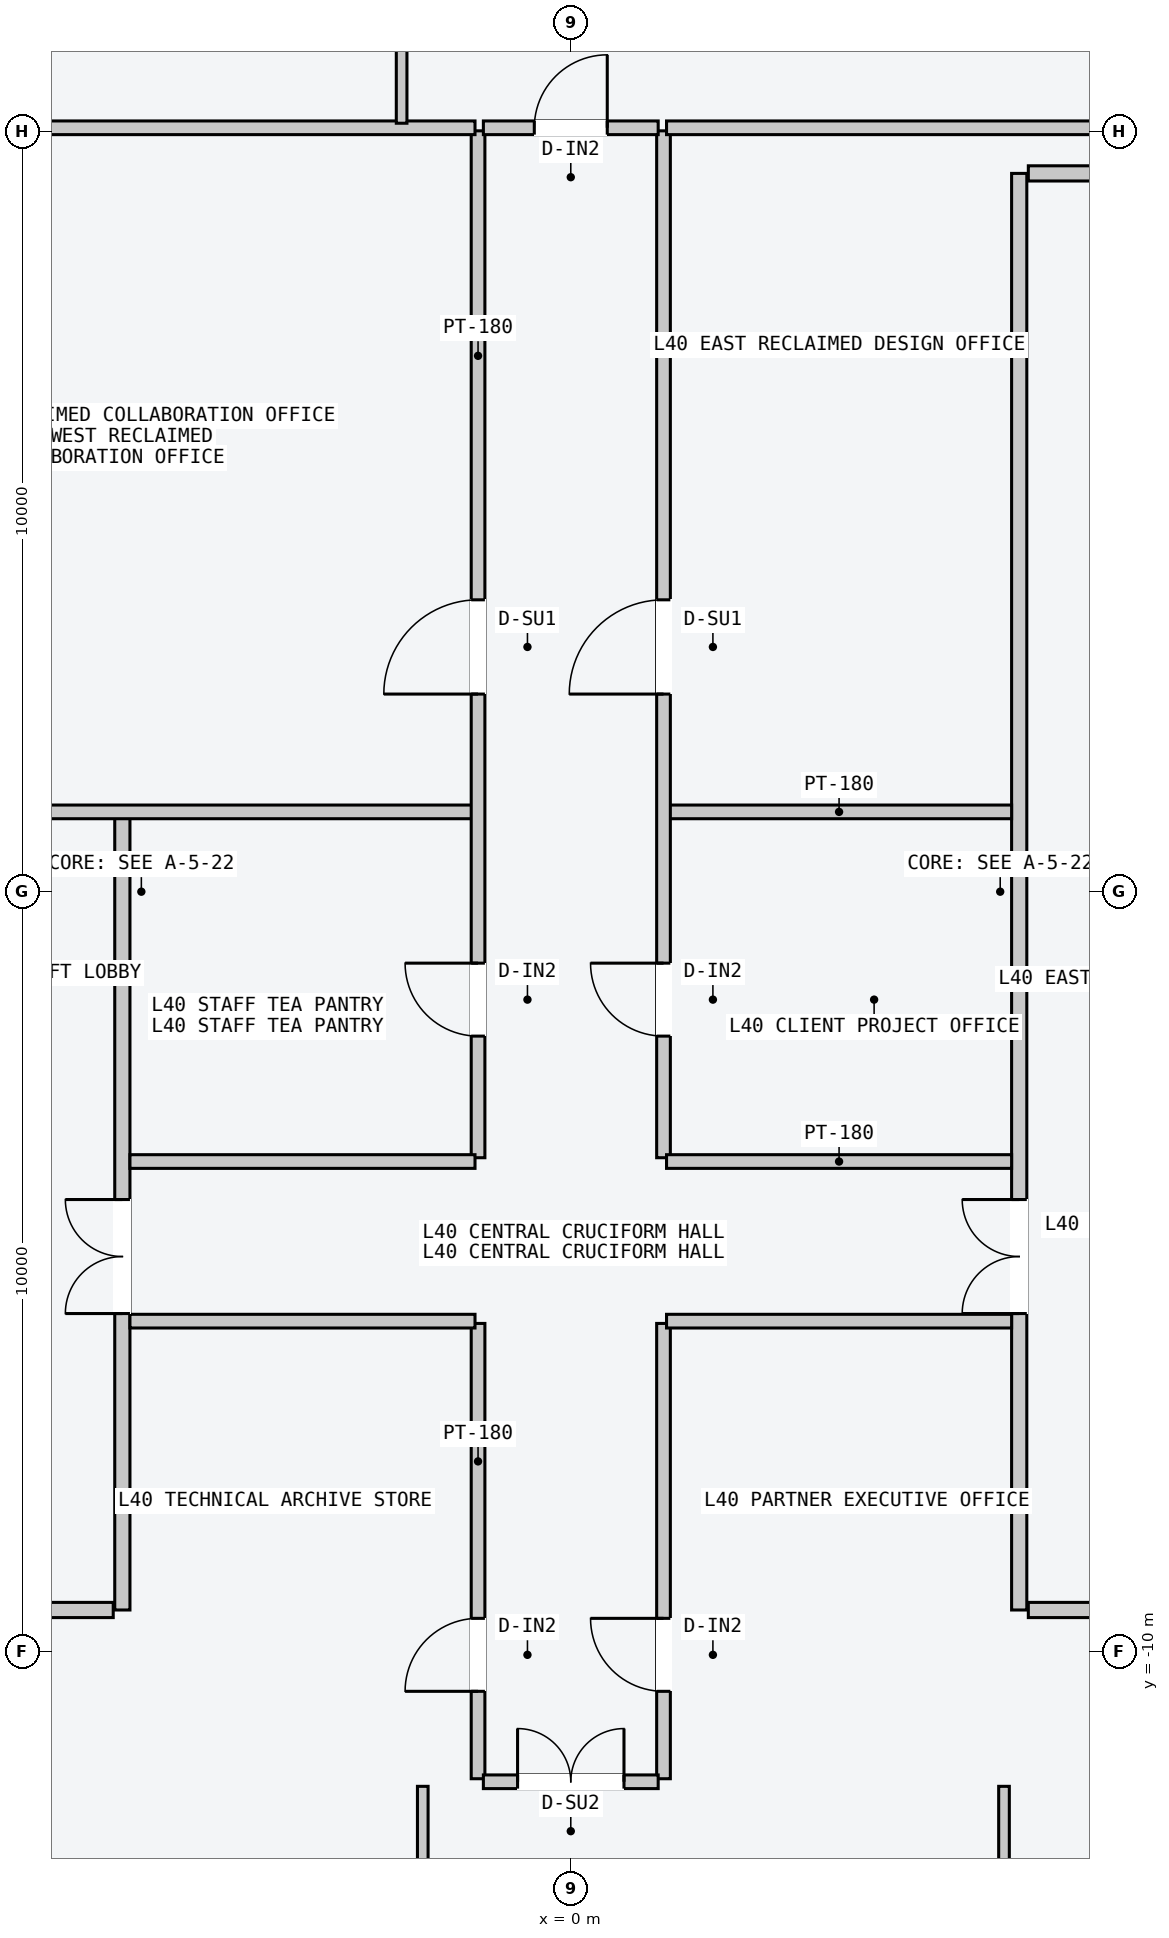
"""IFC4 building model, lengths in metres.
Left out: names, types, materials, properties, quantities, classifications, styles, units other than length and angle.
Written with IfcOpenShell. Run it as: python <this file> out.ifc"""

import sys

from ifc_helpers import new_model, si_unit, direction, frame, frame_2d, origin, place, context, subcontext, project, spatial, rectangle, extrude, element, fill, save


model = new_model("IFC4")
c1 = context("Model", 3, precision=1e-05, world=origin(), true_north=direction((0.0, 1.0)))
c2 = subcontext(c1, "Body", "Model", "MODEL_VIEW")
j1 = project(units=[si_unit("LENGTHUNIT", "METRE"), si_unit("PLANEANGLEUNIT", "RADIAN")], contexts=[c1])
p1 = place(None, origin())
s1 = spatial("IfcSite", under=j1, at=p1, CompositionType="ELEMENT")
p2 = place(p1, origin())
s2 = spatial("IfcBuilding", under=s1, at=p2, CompositionType="ELEMENT")
p3 = place(p2, frame((0.0, 0.0, 155.1)))
s3 = spatial("IfcBuildingStorey", under=s2, at=p3, CompositionType="ELEMENT", Elevation=155.1)
p4 = place(p3, frame((-5.9, -9.45, 0.0), z_axis=(0.0, 0.0, 1.0), x_axis=(0.0, 1.0, 0.0)))
e1 = element("IfcWall", 1, at=p4, inside=s3, PredefinedType="PARTITIONING", context=c2, shape_type="SweptSolid", body=[
    extrude(rectangle(XDim=10.5, YDim=0.2, at=frame_2d((5.25, 0.0))), origin(), (0.0, 0.0, 1.0), 3.4),
])
p5 = place(p4, frame((3.9, 0.0, 0.0)))
e2 = element("IfcOpeningElement", 2, at=p5, cuts=e1, PredefinedType="OPENING", context=c2, shape_type="SweptSolid", body=[
    extrude(rectangle(XDim=1.5, YDim=2.2, at=frame_2d((0.75, 1.1))), frame((0.0, 0.11, 0.0), z_axis=(0.0, -1.0, 0.0), x_axis=(1.0, 0.0, 0.0)), (0.0, 0.0, 1.0), 0.22),
])
p6 = place(p3, frame((-6.02, -9.45, 0.0), z_axis=(0.0, 0.0, 1.0), x_axis=(-1.0, 0.0, 0.0)))
e3 = element("IfcWall", 3, at=p6, inside=s3, PredefinedType="PARTITIONING", context=c2, shape_type="SweptSolid", body=[
    extrude(rectangle(XDim=1.8, YDim=0.2, at=frame_2d((0.9, 0.0))), origin(), (0.0, 0.0, 1.0), 3.4),
])
p7 = place(p3, frame((5.9, -9.45, 0.0), z_axis=(0.0, 0.0, 1.0), x_axis=(0.0, 1.0, 0.0)))
e4 = element("IfcWall", 4, at=p7, inside=s3, PredefinedType="PARTITIONING", context=c2, shape_type="SweptSolid", body=[
    extrude(rectangle(XDim=18.9, YDim=0.2, at=frame_2d((9.45, 0.0))), origin(), (0.0, 0.0, 1.0), 3.4),
])
p8 = place(p7, frame((3.9, 0.0, 0.0)))
e5 = element("IfcOpeningElement", 5, at=p8, cuts=e4, PredefinedType="OPENING", context=c2, shape_type="SweptSolid", body=[
    extrude(rectangle(XDim=1.5, YDim=2.2, at=frame_2d((0.75, 1.1))), frame((0.0, 0.11, 0.0), z_axis=(0.0, -1.0, 0.0), x_axis=(1.0, 0.0, 0.0)), (0.0, 0.0, 1.0), 0.22),
])
for number, where, z_axis, x_axis in (
    (6, (6.02, -9.45, 0.0), (0.0, 0.0, 1.0), (1.0, 0.0, 0.0)),
    (7, (6.02, 9.45, 0.0), (0.0, 0.0, 1.0), (1.0, 0.0, 0.0)),
):
    element("IfcWall", number, at=place(p3, frame(where, z_axis=z_axis, x_axis=x_axis)), inside=s3, PredefinedType="PARTITIONING", context=c2, shape_type="SweptSolid", body=[
        extrude(rectangle(XDim=1.8, YDim=0.2, at=frame_2d((0.9, 0.0))), origin(), (0.0, 0.0, 1.0), 3.4),
    ])
p9 = place(p3, frame((-10.05, 1.05, 0.0), z_axis=(0.0, 0.0, 1.0), x_axis=(1.0, 0.0, 0.0)))
e8 = element("IfcWall", 8, at=p9, inside=s3, PredefinedType="PARTITIONING", context=c2, shape_type="SweptSolid", body=[
    extrude(rectangle(XDim=8.79, YDim=0.18, at=frame_2d((4.395, 0.0))), origin(), (0.0, 0.0, 1.0), 3.4),
])
p10 = place(p3, frame((-1.22, -3.5, 0.0), z_axis=(0.0, 0.0, 1.0), x_axis=(0.0, 1.0, 0.0)))
e9 = element("IfcWall", 9, at=p10, inside=s3, PredefinedType="PARTITIONING", context=c2, shape_type="SweptSolid", body=[
    extrude(rectangle(XDim=13.51, YDim=0.18, at=frame_2d((6.755, 0.0))), origin(), (0.0, 0.0, 1.0), 3.4),
])
p11 = place(p10, frame((6.1, 0.0, 0.0)))
e10 = element("IfcOpeningElement", 10, at=p11, cuts=e9, PredefinedType="OPENING", context=c2, shape_type="SweptSolid", body=[
    extrude(rectangle(XDim=1.24, YDim=2.24, at=frame_2d((0.62, 1.12))), frame((0.0, 0.1, 0.0), z_axis=(0.0, -1.0, 0.0), x_axis=(1.0, 0.0, 0.0)), (0.0, 0.0, 1.0), 0.2),
])
p12 = place(p10, frame((1.6, 0.0, 0.0)))
e11 = element("IfcOpeningElement", 11, at=p12, cuts=e9, PredefinedType="OPENING", context=c2, shape_type="SweptSolid", body=[
    extrude(rectangle(XDim=0.96, YDim=2.18, at=frame_2d((0.48, 1.09))), frame((0.0, 0.1, 0.0), z_axis=(0.0, -1.0, 0.0), x_axis=(1.0, 0.0, 0.0)), (0.0, 0.0, 1.0), 0.2),
])
p13 = place(p3, frame((-7.5, 10.05, 0.0), z_axis=(0.0, 0.0, 1.0), x_axis=(1.0, 0.0, 0.0)))
e12 = element("IfcWall", 12, at=p13, inside=s3, PredefinedType="PARTITIONING", context=c2, shape_type="SweptSolid", body=[
    extrude(rectangle(XDim=6.24, YDim=0.18, at=frame_2d((3.12, 0.0))), origin(), (0.0, 0.0, 1.0), 3.4),
])
for number, where, z_axis, x_axis in (
    (13, (-5.8, -3.55, 0.0), (0.0, 0.0, 1.0), (1.0, 0.0, 0.0)),
    (14, (1.26, 1.05, 0.0), (0.0, 0.0, 1.0), (1.0, 0.0, 0.0)),
):
    element("IfcWall", number, at=place(p3, frame(where, z_axis=z_axis, x_axis=x_axis)), inside=s3, PredefinedType="PARTITIONING", context=c2, shape_type="SweptSolid", body=[
        extrude(rectangle(XDim=4.54, YDim=0.18, at=frame_2d((2.27, 0.0))), origin(), (0.0, 0.0, 1.0), 3.4),
    ])
p14 = place(p3, frame((1.22, -3.5, 0.0), z_axis=(0.0, 0.0, 1.0), x_axis=(0.0, 1.0, 0.0)))
e15 = element("IfcWall", 15, at=p14, inside=s3, PredefinedType="PARTITIONING", context=c2, shape_type="SweptSolid", body=[
    extrude(rectangle(XDim=13.51, YDim=0.18, at=frame_2d((6.755, 0.0))), origin(), (0.0, 0.0, 1.0), 3.4),
])
p15 = place(p14, frame((6.1, 0.0, 0.0)))
e16 = element("IfcOpeningElement", 16, at=p15, cuts=e15, PredefinedType="OPENING", context=c2, shape_type="SweptSolid", body=[
    extrude(rectangle(XDim=1.24, YDim=2.24, at=frame_2d((0.62, 1.12))), frame((0.0, 0.1, 0.0), z_axis=(0.0, -1.0, 0.0), x_axis=(1.0, 0.0, 0.0)), (0.0, 0.0, 1.0), 0.2),
])
p16 = place(p14, frame((1.6, 0.0, 0.0)))
e17 = element("IfcOpeningElement", 17, at=p16, cuts=e15, PredefinedType="OPENING", context=c2, shape_type="SweptSolid", body=[
    extrude(rectangle(XDim=0.96, YDim=2.18, at=frame_2d((0.48, 1.09))), frame((0.0, 0.1, 0.0), z_axis=(0.0, -1.0, 0.0), x_axis=(1.0, 0.0, 0.0)), (0.0, 0.0, 1.0), 0.2),
])
p17 = place(p3, frame((1.26, 10.05, 0.0), z_axis=(0.0, 0.0, 1.0), x_axis=(1.0, 0.0, 0.0)))
e18 = element("IfcWall", 18, at=p17, inside=s3, PredefinedType="PARTITIONING", context=c2, shape_type="SweptSolid", body=[
    extrude(rectangle(XDim=6.24, YDim=0.18, at=frame_2d((3.12, 0.0))), origin(), (0.0, 0.0, 1.0), 3.4),
])
p18 = place(p3, frame((1.26, -3.55, 0.0), z_axis=(0.0, 0.0, 1.0), x_axis=(1.0, 0.0, 0.0)))
e19 = element("IfcWall", 19, at=p18, inside=s3, PredefinedType="PARTITIONING", context=c2, shape_type="SweptSolid", body=[
    extrude(rectangle(XDim=4.54, YDim=0.18, at=frame_2d((2.27, 0.0))), origin(), (0.0, 0.0, 1.0), 3.4),
])
p19 = place(p3, frame((-1.22, -11.67, 0.0), z_axis=(0.0, 0.0, 1.0), x_axis=(0.0, 1.0, 0.0)))
e20 = element("IfcWall", 20, at=p19, inside=s3, PredefinedType="PARTITIONING", context=c2, shape_type="SweptSolid", body=[
    extrude(rectangle(XDim=5.99, YDim=0.18, at=frame_2d((2.995, 0.0))), origin(), (0.0, 0.0, 1.0), 3.4),
])
p20 = place(p19, frame((1.15, 0.0, 0.0)))
e21 = element("IfcOpeningElement", 21, at=p20, cuts=e20, PredefinedType="OPENING", context=c2, shape_type="SweptSolid", body=[
    extrude(rectangle(XDim=0.96, YDim=2.18, at=frame_2d((0.48, 1.09))), frame((0.0, 0.1, 0.0), z_axis=(0.0, -1.0, 0.0), x_axis=(1.0, 0.0, 0.0)), (0.0, 0.0, 1.0), 0.2),
])
p21 = place(p3, frame((1.22, -11.67, 0.0), z_axis=(0.0, 0.0, 1.0), x_axis=(0.0, 1.0, 0.0)))
e22 = element("IfcWall", 22, at=p21, inside=s3, PredefinedType="PARTITIONING", context=c2, shape_type="SweptSolid", body=[
    extrude(rectangle(XDim=5.99, YDim=0.18, at=frame_2d((2.995, 0.0))), origin(), (0.0, 0.0, 1.0), 3.4),
])
p22 = place(p21, frame((1.15, 0.0, 0.0)))
e23 = element("IfcOpeningElement", 23, at=p22, cuts=e22, PredefinedType="OPENING", context=c2, shape_type="SweptSolid", body=[
    extrude(rectangle(XDim=0.96, YDim=2.18, at=frame_2d((0.48, 1.09))), frame((0.0, 0.1, 0.0), z_axis=(0.0, -1.0, 0.0), x_axis=(1.0, 0.0, 0.0)), (0.0, 0.0, 1.0), 0.2),
])
for number, where, z_axis, x_axis in (
    (24, (-5.8, -5.65, 0.0), (0.0, 0.0, 1.0), (1.0, 0.0, 0.0)),
    (25, (1.26, -5.65, 0.0), (0.0, 0.0, 1.0), (1.0, 0.0, 0.0)),
):
    element("IfcWall", number, at=place(p3, frame(where, z_axis=z_axis, x_axis=x_axis)), inside=s3, PredefinedType="PARTITIONING", context=c2, shape_type="SweptSolid", body=[
        extrude(rectangle(XDim=4.54, YDim=0.18, at=frame_2d((2.27, 0.0))), origin(), (0.0, 0.0, 1.0), 3.4),
    ])
p23 = place(p3, frame((-2.226, 10.11, 0.0), z_axis=(0.0, 0.0, 1.0), x_axis=(0.0, 1.0, 0.0)))
e26 = element("IfcWall", 26, at=p23, inside=s3, PredefinedType="PARTITIONING", context=c2, shape_type="SweptSolid", body=[
    extrude(rectangle(XDim=8.45, YDim=0.14, at=frame_2d((4.225, 0.0))), origin(), (0.0, 0.0, 1.0), 3.4),
])
p24 = place(p23, frame((1.15, 0.0, 0.0)))
e27 = element("IfcOpeningElement", 27, at=p24, cuts=e26, PredefinedType="OPENING", context=c2, shape_type="SweptSolid", body=[
    extrude(rectangle(XDim=0.96, YDim=2.18, at=frame_2d((0.48, 1.09))), frame((0.0, 0.08, 0.0), z_axis=(0.0, -1.0, 0.0), x_axis=(1.0, 0.0, 0.0)), (0.0, 0.0, 1.0), 0.16),
])
p25 = place(p3, frame((-1.15, 10.05, 0.0), z_axis=(0.0, 0.0, 1.0), x_axis=(1.0, 0.0, 0.0)))
e28 = element("IfcWall", 28, at=p25, inside=s3, PredefinedType="PARTITIONING", context=c2, shape_type="SweptSolid", body=[
    extrude(rectangle(XDim=2.3, YDim=0.18, at=frame_2d((1.15, 0.0))), origin(), (0.0, 0.0, 1.0), 3.4),
])
p26 = place(p25, frame((0.67, 0.0, 0.0)))
e29 = element("IfcOpeningElement", 29, at=p26, cuts=e28, PredefinedType="OPENING", context=c2, shape_type="SweptSolid", body=[
    extrude(rectangle(XDim=0.96, YDim=2.18, at=frame_2d((0.48, 1.09))), frame((0.0, 0.1, 0.0), z_axis=(0.0, -1.0, 0.0), x_axis=(1.0, 0.0, 0.0)), (0.0, 0.0, 1.0), 0.2),
])
p27 = place(p3, frame((-1.948, -18.56, 0.0), z_axis=(0.0, 0.0, 1.0), x_axis=(0.0, 1.0, 0.0)))
e30 = element("IfcWall", 30, at=p27, inside=s3, PredefinedType="PARTITIONING", context=c2, shape_type="SweptSolid", body=[
    extrude(rectangle(XDim=6.79, YDim=0.14, at=frame_2d((3.395, 0.0))), origin(), (0.0, 0.0, 1.0), 3.4),
])
p28 = place(p27, frame((1.05, 0.0, 0.0)))
e31 = element("IfcOpeningElement", 31, at=p28, cuts=e30, PredefinedType="OPENING", context=c2, shape_type="SweptSolid", body=[
    extrude(rectangle(XDim=0.96, YDim=2.18, at=frame_2d((0.48, 1.09))), frame((0.0, 0.08, 0.0), z_axis=(0.0, -1.0, 0.0), x_axis=(1.0, 0.0, 0.0)), (0.0, 0.0, 1.0), 0.16),
])
p29 = place(p3, frame((5.7, -18.56, 0.0), z_axis=(0.0, 0.0, 1.0), x_axis=(0.0, 1.0, 0.0)))
e32 = element("IfcWall", 32, at=p29, inside=s3, PredefinedType="PARTITIONING", context=c2, shape_type="SweptSolid", body=[
    extrude(rectangle(XDim=6.79, YDim=0.14, at=frame_2d((3.395, 0.0))), origin(), (0.0, 0.0, 1.0), 3.4),
])
p30 = place(p29, frame((1.05, 0.0, 0.0)))
e33 = element("IfcOpeningElement", 33, at=p30, cuts=e32, PredefinedType="OPENING", context=c2, shape_type="SweptSolid", body=[
    extrude(rectangle(XDim=0.96, YDim=2.18, at=frame_2d((0.48, 1.09))), frame((0.0, 0.08, 0.0), z_axis=(0.0, -1.0, 0.0), x_axis=(1.0, 0.0, 0.0)), (0.0, 0.0, 1.0), 0.16),
])
p31 = place(p3, frame((-1.15, -11.71, 0.0), z_axis=(0.0, 0.0, 1.0), x_axis=(1.0, 0.0, 0.0)))
e34 = element("IfcWall", 34, at=p31, inside=s3, PredefinedType="PARTITIONING", context=c2, shape_type="SweptSolid", body=[
    extrude(rectangle(XDim=2.3, YDim=0.18, at=frame_2d((1.15, 0.0))), origin(), (0.0, 0.0, 1.0), 3.4),
])
p32 = place(p31, frame((0.45, 0.0, 0.0)))
e35 = element("IfcOpeningElement", 35, at=p32, cuts=e34, PredefinedType="OPENING", context=c2, shape_type="SweptSolid", body=[
    extrude(rectangle(XDim=1.4, YDim=2.2, at=frame_2d((0.7, 1.1))), frame((0.0, 0.1, 0.0), z_axis=(0.0, -1.0, 0.0), x_axis=(1.0, 0.0, 0.0)), (0.0, 0.0, 1.0), 0.2),
])
p33 = place(p5, origin())
e36 = element("IfcDoor", 36, at=p33, inside=s3, OperationType="DOUBLE_DOOR_SINGLE_SWING", PredefinedType="DOOR", context=c2, shape_type="SweptSolid", body=[
    extrude(rectangle(XDim=1.5, YDim=2.2, at=frame_2d((0.75, 1.1))), frame((0.0, 0.025, 0.0), z_axis=(0.0, -1.0, 0.0), x_axis=(1.0, 0.0, 0.0)), (0.0, 0.0, 1.0), 0.05),
])
fill(e2, e36)
p34 = place(p8, origin())
e37 = element("IfcDoor", 37, at=p34, inside=s3, OperationType="DOUBLE_DOOR_SINGLE_SWING", PredefinedType="DOOR", context=c2, shape_type="SweptSolid", body=[
    extrude(rectangle(XDim=1.5, YDim=2.2, at=frame_2d((0.75, 1.1))), frame((0.0, 0.025, 0.0), z_axis=(0.0, -1.0, 0.0), x_axis=(1.0, 0.0, 0.0)), (0.0, 0.0, 1.0), 0.05),
])
fill(e5, e37)
p35 = place(p11, origin())
e38 = element("IfcDoor", 38, at=p35, inside=s3, OperationType="SINGLE_SWING_LEFT", PredefinedType="DOOR", context=c2, shape_type="SweptSolid", body=[
    extrude(rectangle(XDim=1.24, YDim=2.24, at=frame_2d((0.62, 1.12))), frame((0.0, 0.025, 0.0), z_axis=(0.0, -1.0, 0.0), x_axis=(1.0, 0.0, 0.0)), (0.0, 0.0, 1.0), 0.05),
])
fill(e10, e38)
p36 = place(p12, origin())
e39 = element("IfcDoor", 39, at=p36, inside=s3, OperationType="SINGLE_SWING_RIGHT", PredefinedType="DOOR", context=c2, shape_type="SweptSolid", body=[
    extrude(rectangle(XDim=0.96, YDim=2.18, at=frame_2d((0.48, 1.09))), frame((0.0, 0.025, 0.0), z_axis=(0.0, -1.0, 0.0), x_axis=(1.0, 0.0, 0.0)), (0.0, 0.0, 1.0), 0.05),
])
fill(e11, e39)
p37 = place(p15, origin())
e40 = element("IfcDoor", 40, at=p37, inside=s3, OperationType="SINGLE_SWING_LEFT", PredefinedType="DOOR", context=c2, shape_type="SweptSolid", body=[
    extrude(rectangle(XDim=1.24, YDim=2.24, at=frame_2d((0.62, 1.12))), frame((0.0, 0.025, 0.0), z_axis=(0.0, -1.0, 0.0), x_axis=(1.0, 0.0, 0.0)), (0.0, 0.0, 1.0), 0.05),
])
fill(e16, e40)
p38 = place(p16, origin())
e41 = element("IfcDoor", 41, at=p38, inside=s3, OperationType="SINGLE_SWING_RIGHT", PredefinedType="DOOR", context=c2, shape_type="SweptSolid", body=[
    extrude(rectangle(XDim=0.96, YDim=2.18, at=frame_2d((0.48, 1.09))), frame((0.0, 0.025, 0.0), z_axis=(0.0, -1.0, 0.0), x_axis=(1.0, 0.0, 0.0)), (0.0, 0.0, 1.0), 0.05),
])
fill(e17, e41)
p39 = place(p20, origin())
e42 = element("IfcDoor", 42, at=p39, inside=s3, OperationType="SINGLE_SWING_LEFT", PredefinedType="DOOR", context=c2, shape_type="SweptSolid", body=[
    extrude(rectangle(XDim=0.96, YDim=2.18, at=frame_2d((0.48, 1.09))), frame((0.0, 0.025, 0.0), z_axis=(0.0, -1.0, 0.0), x_axis=(1.0, 0.0, 0.0)), (0.0, 0.0, 1.0), 0.05),
])
fill(e21, e42)
p40 = place(p22, origin())
e43 = element("IfcDoor", 43, at=p40, inside=s3, OperationType="SINGLE_SWING_RIGHT", PredefinedType="DOOR", context=c2, shape_type="SweptSolid", body=[
    extrude(rectangle(XDim=0.96, YDim=2.18, at=frame_2d((0.48, 1.09))), frame((0.0, 0.025, 0.0), z_axis=(0.0, -1.0, 0.0), x_axis=(1.0, 0.0, 0.0)), (0.0, 0.0, 1.0), 0.05),
])
fill(e23, e43)
p41 = place(p26, origin())
e44 = element("IfcDoor", 44, at=p41, inside=s3, OperationType="SINGLE_SWING_RIGHT", PredefinedType="DOOR", context=c2, shape_type="SweptSolid", body=[
    extrude(rectangle(XDim=0.96, YDim=2.18, at=frame_2d((0.48, 1.09))), frame((0.0, 0.025, 0.0), z_axis=(0.0, -1.0, 0.0), x_axis=(1.0, 0.0, 0.0)), (0.0, 0.0, 1.0), 0.05),
])
fill(e29, e44)
p42 = place(p32, origin())
e45 = element("IfcDoor", 45, at=p42, inside=s3, OperationType="DOUBLE_DOOR_SINGLE_SWING", PredefinedType="DOOR", context=c2, shape_type="SweptSolid", body=[
    extrude(rectangle(XDim=1.4, YDim=2.2, at=frame_2d((0.7, 1.1))), frame((0.0, 0.025, 0.0), z_axis=(0.0, -1.0, 0.0), x_axis=(1.0, 0.0, 0.0)), (0.0, 0.0, 1.0), 0.05),
])
fill(e35, e45)
save(model, sys.argv[1])
